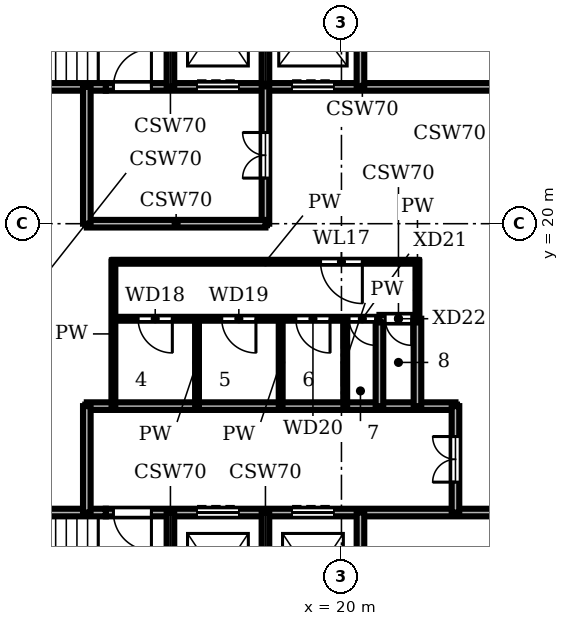
"""IFC4 building model, lengths in metres.
Left out: names, types, materials, properties, quantities, classifications, styles, units other than length and angle.
Written with IfcOpenShell. Run it as: python <this file> out.ifc"""

import sys

from ifc_helpers import new_model, si_unit, direction, frame, frame_2d, origin, place, context, subcontext, project, spatial, rectangle, extrude, element, fill, save


model = new_model("IFC4")
c1 = context("Model", 3, precision=1e-05, world=origin(), true_north=direction((0.0, 1.0)))
c2 = subcontext(c1, "Body", "Model", "MODEL_VIEW")
j1 = project(units=[si_unit("LENGTHUNIT", "METRE"), si_unit("PLANEANGLEUNIT", "RADIAN")], contexts=[c1])
p1 = place(None, origin())
s1 = spatial("IfcSite", under=j1, at=p1, CompositionType="ELEMENT")
p2 = place(p1, origin())
s2 = spatial("IfcBuilding", under=s1, at=p2, CompositionType="ELEMENT")
p3 = place(p2, frame((0.0, 0.0, 213.6)))
s3 = spatial("IfcBuildingStorey", under=s2, at=p3, CompositionType="ELEMENT", Elevation=213.6)
p4 = place(p3, frame((8.7, 12.4, 0.0), z_axis=(0.0, 0.0, 1.0), x_axis=(1.0, 0.0, 0.0)))
e1 = element("IfcWall", 1, at=p4, inside=s3, PredefinedType="SHEAR", context=c2, shape_type="SweptSolid", body=[
    extrude(rectangle(XDim=5.1, YDim=0.2, at=frame_2d((2.55, 0.0))), origin(), (0.0, 0.0, 1.0), 3.58),
])
p5 = place(p3, frame((13.8, 12.4, 0.0), z_axis=(0.0, 0.0, 1.0), x_axis=(1.0, 0.0, 0.0)))
e2 = element("IfcWall", 2, at=p5, inside=s3, PredefinedType="SHEAR", context=c2, shape_type="SweptSolid", body=[
    extrude(rectangle(XDim=13.5, YDim=0.2, at=frame_2d((6.75, 0.0))), origin(), (0.0, 0.0, 1.0), 3.58),
])
p6 = place(p5, frame((2.4, 0.0, 0.0)))
e3 = element("IfcOpeningElement", 3, at=p6, cuts=e2, PredefinedType="OPENING", context=c2, shape_type="SweptSolid", body=[
    extrude(rectangle(XDim=1.1, YDim=2.1, at=frame_2d((0.55, 1.05))), frame((0.0, 0.11, 0.0), z_axis=(0.0, -1.0, 0.0), x_axis=(1.0, 0.0, 0.0)), (0.0, 0.0, 1.0), 0.22),
])
p7 = place(p5, frame((4.9, 0.0, 0.0)))
e4 = element("IfcOpeningElement", 4, at=p7, cuts=e2, PredefinedType="OPENING", context=c2, shape_type="SweptSolid", body=[
    extrude(rectangle(XDim=1.1, YDim=2.1, at=frame_2d((0.55, 1.05))), frame((0.0, 0.11, 0.0), z_axis=(0.0, -1.0, 0.0), x_axis=(1.0, 0.0, 0.0)), (0.0, 0.0, 1.0), 0.22),
])
p8 = place(p5, frame((0.2, 0.0, 0.0)))
e5 = element("IfcOpeningElement", 5, at=p8, cuts=e2, PredefinedType="OPENING", context=c2, shape_type="SweptSolid", body=[
    extrude(rectangle(XDim=1.0, YDim=2.1, at=frame_2d((0.5, 1.05))), frame((0.0, 0.11, 0.0), z_axis=(0.0, -1.0, 0.0), x_axis=(1.0, 0.0, 0.0)), (0.0, 0.0, 1.0), 0.22),
])
p9 = place(p3, frame((13.3, 15.2, 0.0), z_axis=(0.0, 0.0, 1.0), x_axis=(1.0, 0.0, 0.0)))
e6 = element("IfcWall", 6, at=p9, inside=s3, PredefinedType="SHEAR", context=c2, shape_type="SweptSolid", body=[
    extrude(rectangle(XDim=9.7, YDim=0.2, at=frame_2d((4.85, 0.0))), origin(), (0.0, 0.0, 1.0), 3.58),
])
p10 = place(p3, frame((14.0, 17.5, 0.0), z_axis=(0.0, 0.0, 1.0), x_axis=(1.0, 0.0, 0.0)))
e7 = element("IfcWall", 7, at=p10, inside=s3, PredefinedType="PARTITIONING", context=c2, shape_type="SweptSolid", body=[
    extrude(rectangle(XDim=7.0, YDim=0.1, at=frame_2d((3.5, 0.0))), origin(), (0.0, 0.0, 1.0), 3.58),
])
p11 = place(p10, frame((0.65, 0.0, 0.0)))
e8 = element("IfcOpeningElement", 8, at=p11, cuts=e7, PredefinedType="OPENING", context=c2, shape_type="SweptSolid", body=[
    extrude(rectangle(XDim=0.9, YDim=2.1, at=frame_2d((0.45, 1.05))), frame((0.0, 0.06, 0.0), z_axis=(0.0, -1.0, 0.0), x_axis=(1.0, 0.0, 0.0)), (0.0, 0.0, 1.0), 0.12),
])
p12 = place(p10, frame((2.85, 0.0, 0.0)))
e9 = element("IfcOpeningElement", 9, at=p12, cuts=e7, PredefinedType="OPENING", context=c2, shape_type="SweptSolid", body=[
    extrude(rectangle(XDim=0.9, YDim=2.1, at=frame_2d((0.45, 1.05))), frame((0.0, 0.06, 0.0), z_axis=(0.0, -1.0, 0.0), x_axis=(1.0, 0.0, 0.0)), (0.0, 0.0, 1.0), 0.12),
])
p13 = place(p10, frame((4.8, 0.0, 0.0)))
e10 = element("IfcOpeningElement", 10, at=p13, cuts=e7, PredefinedType="OPENING", context=c2, shape_type="SweptSolid", body=[
    extrude(rectangle(XDim=0.9, YDim=2.1, at=frame_2d((0.45, 1.05))), frame((0.0, 0.06, 0.0), z_axis=(0.0, -1.0, 0.0), x_axis=(1.0, 0.0, 0.0)), (0.0, 0.0, 1.0), 0.12),
])
p14 = place(p10, frame((6.2, 0.0, 0.0)))
e11 = element("IfcOpeningElement", 11, at=p14, cuts=e7, PredefinedType="OPENING", context=c2, shape_type="SweptSolid", body=[
    extrude(rectangle(XDim=0.7, YDim=2.1, at=frame_2d((0.35, 1.05))), frame((0.0, 0.06, 0.0), z_axis=(0.0, -1.0, 0.0), x_axis=(1.0, 0.0, 0.0)), (0.0, 0.0, 1.0), 0.12),
])
p15 = place(p3, frame((21.0, 17.5, 0.0), z_axis=(0.0, 0.0, 1.0), x_axis=(1.0, 0.0, 0.0)))
e12 = element("IfcWall", 12, at=p15, inside=s3, PredefinedType="SHEAR", context=c2, shape_type="SweptSolid", body=[
    extrude(rectangle(XDim=1.0, YDim=0.2, at=frame_2d((0.5, 0.0))), origin(), (0.0, 0.0, 1.0), 3.58),
])
p16 = place(p15, frame((0.15, 0.0, 0.0)))
e13 = element("IfcOpeningElement", 13, at=p16, cuts=e12, PredefinedType="OPENING", context=c2, shape_type="SweptSolid", body=[
    extrude(rectangle(XDim=0.7, YDim=2.1, at=frame_2d((0.35, 1.05))), frame((0.0, 0.11, 0.0), z_axis=(0.0, -1.0, 0.0), x_axis=(1.0, 0.0, 0.0)), (0.0, 0.0, 1.0), 0.22),
])
p17 = place(p3, frame((14.0, 19.0, 0.0), z_axis=(0.0, 0.0, 1.0), x_axis=(1.0, 0.0, 0.0)))
e14 = element("IfcWall", 14, at=p17, inside=s3, PredefinedType="PARTITIONING", context=c2, shape_type="SweptSolid", body=[
    extrude(rectangle(XDim=8.0, YDim=0.1, at=frame_2d((4.0, 0.0))), origin(), (0.0, 0.0, 1.0), 3.58),
])
p18 = place(p17, frame((5.45, 0.0, 0.0)))
e15 = element("IfcOpeningElement", 15, at=p18, cuts=e14, PredefinedType="OPENING", context=c2, shape_type="SweptSolid", body=[
    extrude(rectangle(XDim=1.1, YDim=2.1, at=frame_2d((0.55, 1.05))), frame((0.0, 0.06, 0.0), z_axis=(0.0, -1.0, 0.0), x_axis=(1.0, 0.0, 0.0)), (0.0, 0.0, 1.0), 0.12),
])
p19 = place(p3, frame((13.3, 20.0, 0.0), z_axis=(0.0, 0.0, 1.0), x_axis=(1.0, 0.0, 0.0)))
e16 = element("IfcWall", 16, at=p19, inside=s3, PredefinedType="SHEAR", context=c2, shape_type="SweptSolid", body=[
    extrude(rectangle(XDim=4.7, YDim=0.2, at=frame_2d((2.35, 0.0))), origin(), (0.0, 0.0, 1.0), 3.58),
])
p20 = place(p3, frame((8.7, 23.6, 0.0), z_axis=(0.0, 0.0, 1.0), x_axis=(1.0, 0.0, 0.0)))
e17 = element("IfcWall", 17, at=p20, inside=s3, PredefinedType="SHEAR", context=c2, shape_type="SweptSolid", body=[
    extrude(rectangle(XDim=5.1, YDim=0.2, at=frame_2d((2.55, 0.0))), origin(), (0.0, 0.0, 1.0), 3.58),
])
p21 = place(p3, frame((13.8, 23.6, 0.0), z_axis=(0.0, 0.0, 1.0), x_axis=(1.0, 0.0, 0.0)))
e18 = element("IfcWall", 18, at=p21, inside=s3, PredefinedType="SHEAR", context=c2, shape_type="SweptSolid", body=[
    extrude(rectangle(XDim=13.5, YDim=0.2, at=frame_2d((6.75, 0.0))), origin(), (0.0, 0.0, 1.0), 3.58),
])
p22 = place(p21, frame((2.4, 0.0, 0.0)))
e19 = element("IfcOpeningElement", 19, at=p22, cuts=e18, PredefinedType="OPENING", context=c2, shape_type="SweptSolid", body=[
    extrude(rectangle(XDim=1.1, YDim=2.1, at=frame_2d((0.55, 1.05))), frame((0.0, 0.11, 0.0), z_axis=(0.0, -1.0, 0.0), x_axis=(1.0, 0.0, 0.0)), (0.0, 0.0, 1.0), 0.22),
])
p23 = place(p21, frame((4.9, 0.0, 0.0)))
e20 = element("IfcOpeningElement", 20, at=p23, cuts=e18, PredefinedType="OPENING", context=c2, shape_type="SweptSolid", body=[
    extrude(rectangle(XDim=1.1, YDim=2.1, at=frame_2d((0.55, 1.05))), frame((0.0, 0.11, 0.0), z_axis=(0.0, -1.0, 0.0), x_axis=(1.0, 0.0, 0.0)), (0.0, 0.0, 1.0), 0.22),
])
p24 = place(p21, frame((0.2, 0.0, 0.0)))
e21 = element("IfcOpeningElement", 21, at=p24, cuts=e18, PredefinedType="OPENING", context=c2, shape_type="SweptSolid", body=[
    extrude(rectangle(XDim=1.0, YDim=2.1, at=frame_2d((0.5, 1.05))), frame((0.0, 0.11, 0.0), z_axis=(0.0, -1.0, 0.0), x_axis=(1.0, 0.0, 0.0)), (0.0, 0.0, 1.0), 0.22),
])
p25 = place(p3, frame((13.3, 12.4, 0.0), z_axis=(0.0, 0.0, 1.0), x_axis=(0.0, 1.0, 0.0)))
e22 = element("IfcWall", 22, at=p25, inside=s3, PredefinedType="SHEAR", context=c2, shape_type="SweptSolid", body=[
    extrude(rectangle(XDim=2.8, YDim=0.2, at=frame_2d((1.4, 0.0))), origin(), (0.0, 0.0, 1.0), 3.58),
])
p26 = place(p3, frame((13.3, 20.0, 0.0), z_axis=(0.0, 0.0, 1.0), x_axis=(0.0, 1.0, 0.0)))
e23 = element("IfcWall", 23, at=p26, inside=s3, PredefinedType="SHEAR", context=c2, shape_type="SweptSolid", body=[
    extrude(rectangle(XDim=3.6, YDim=0.2, at=frame_2d((1.8, 0.0))), origin(), (0.0, 0.0, 1.0), 3.58),
])
p27 = place(p3, frame((14.0, 15.2, 0.0), z_axis=(0.0, 0.0, 1.0), x_axis=(0.0, 1.0, 0.0)))
e24 = element("IfcWall", 24, at=p27, inside=s3, PredefinedType="PARTITIONING", context=c2, shape_type="SweptSolid", body=[
    extrude(rectangle(XDim=3.8, YDim=0.1, at=frame_2d((1.9, 0.0))), origin(), (0.0, 0.0, 1.0), 3.58),
])
for number, where, z_axis, x_axis in (
    (25, (15.5, 8.7, 0.0), (0.0, 0.0, 1.0), (0.0, 1.0, 0.0)),
    (26, (15.5, 23.6, 0.0), (0.0, 0.0, 1.0), (0.0, 1.0, 0.0)),
):
    element("IfcWall", number, at=place(p3, frame(where, z_axis=z_axis, x_axis=x_axis)), inside=s3, PredefinedType="SHEAR", context=c2, shape_type="SweptSolid", body=[
        extrude(rectangle(XDim=3.7, YDim=0.2, at=frame_2d((1.85, 0.0))), origin(), (0.0, 0.0, 1.0), 3.58),
    ])
p28 = place(p3, frame((16.2, 15.2, 0.0), z_axis=(0.0, 0.0, 1.0), x_axis=(0.0, 1.0, 0.0)))
e27 = element("IfcWall", 27, at=p28, inside=s3, PredefinedType="PARTITIONING", context=c2, shape_type="SweptSolid", body=[
    extrude(rectangle(XDim=2.3, YDim=0.1, at=frame_2d((1.15, 0.0))), origin(), (0.0, 0.0, 1.0), 3.58),
])
p29 = place(p3, frame((18.0, 8.7, 0.0), z_axis=(0.0, 0.0, 1.0), x_axis=(0.0, 1.0, 0.0)))
e28 = element("IfcWall", 28, at=p29, inside=s3, PredefinedType="SHEAR", context=c2, shape_type="SweptSolid", body=[
    extrude(rectangle(XDim=3.7, YDim=0.2, at=frame_2d((1.85, 0.0))), origin(), (0.0, 0.0, 1.0), 3.58),
])
p30 = place(p3, frame((18.0, 20.0, 0.0), z_axis=(0.0, 0.0, 1.0), x_axis=(0.0, 1.0, 0.0)))
e29 = element("IfcWall", 29, at=p30, inside=s3, PredefinedType="SHEAR", context=c2, shape_type="SweptSolid", body=[
    extrude(rectangle(XDim=7.3, YDim=0.2, at=frame_2d((3.65, 0.0))), origin(), (0.0, 0.0, 1.0), 3.58),
])
p31 = place(p30, frame((1.2, 0.0, 0.0)))
e30 = element("IfcOpeningElement", 30, at=p31, cuts=e29, PredefinedType="OPENING", context=c2, shape_type="SweptSolid", body=[
    extrude(rectangle(XDim=1.2, YDim=2.1, at=frame_2d((0.6, 1.05))), frame((0.0, 0.11, 0.0), z_axis=(0.0, -1.0, 0.0), x_axis=(1.0, 0.0, 0.0)), (0.0, 0.0, 1.0), 0.22),
])
for number, where, z_axis, x_axis in (
    (31, (18.4, 15.2, 0.0), (0.0, 0.0, 1.0), (0.0, 1.0, 0.0)),
    (32, (20.1, 15.2, 0.0), (0.0, 0.0, 1.0), (0.0, 1.0, 0.0)),
):
    element("IfcWall", number, at=place(p3, frame(where, z_axis=z_axis, x_axis=x_axis)), inside=s3, PredefinedType="PARTITIONING", context=c2, shape_type="SweptSolid", body=[
        extrude(rectangle(XDim=2.3, YDim=0.1, at=frame_2d((1.15, 0.0))), origin(), (0.0, 0.0, 1.0), 3.58),
    ])
for number, where, z_axis, x_axis in (
    (33, (20.5, 8.7, 0.0), (0.0, 0.0, 1.0), (0.0, 1.0, 0.0)),
    (34, (20.5, 23.6, 0.0), (0.0, 0.0, 1.0), (0.0, 1.0, 0.0)),
):
    element("IfcWall", number, at=place(p3, frame(where, z_axis=z_axis, x_axis=x_axis)), inside=s3, PredefinedType="SHEAR", context=c2, shape_type="SweptSolid", body=[
        extrude(rectangle(XDim=3.7, YDim=0.2, at=frame_2d((1.85, 0.0))), origin(), (0.0, 0.0, 1.0), 3.58),
    ])
p32 = place(p3, frame((21.0, 15.2, 0.0), z_axis=(0.0, 0.0, 1.0), x_axis=(0.0, 1.0, 0.0)))
e35 = element("IfcWall", 35, at=p32, inside=s3, PredefinedType="SHEAR", context=c2, shape_type="SweptSolid", body=[
    extrude(rectangle(XDim=2.3, YDim=0.2, at=frame_2d((1.15, 0.0))), origin(), (0.0, 0.0, 1.0), 3.58),
])
p33 = place(p3, frame((22.0, 17.5, 0.0), z_axis=(0.0, 0.0, 1.0), x_axis=(0.0, 1.0, 0.0)))
e36 = element("IfcWall", 36, at=p33, inside=s3, PredefinedType="PARTITIONING", context=c2, shape_type="SweptSolid", body=[
    extrude(rectangle(XDim=1.5, YDim=0.1, at=frame_2d((0.75, 0.0))), origin(), (0.0, 0.0, 1.0), 3.58),
])
p34 = place(p3, frame((22.0, 15.2, 0.0), z_axis=(0.0, 0.0, 1.0), x_axis=(0.0, 1.0, 0.0)))
e37 = element("IfcWall", 37, at=p34, inside=s3, PredefinedType="SHEAR", context=c2, shape_type="SweptSolid", body=[
    extrude(rectangle(XDim=2.3, YDim=0.2, at=frame_2d((1.15, 0.0))), origin(), (0.0, 0.0, 1.0), 3.58),
])
p35 = place(p3, frame((23.0, 12.4, 0.0), z_axis=(0.0, 0.0, 1.0), x_axis=(0.0, 1.0, 0.0)))
e38 = element("IfcWall", 38, at=p35, inside=s3, PredefinedType="SHEAR", context=c2, shape_type="SweptSolid", body=[
    extrude(rectangle(XDim=2.8, YDim=0.2, at=frame_2d((1.4, 0.0))), origin(), (0.0, 0.0, 1.0), 3.58),
])
p36 = place(p35, frame((0.8, 0.0, 0.0)))
e39 = element("IfcOpeningElement", 39, at=p36, cuts=e38, PredefinedType="OPENING", context=c2, shape_type="SweptSolid", body=[
    extrude(rectangle(XDim=1.2, YDim=2.1, at=frame_2d((0.6, 1.05))), frame((0.0, 0.11, 0.0), z_axis=(0.0, -1.0, 0.0), x_axis=(1.0, 0.0, 0.0)), (0.0, 0.0, 1.0), 0.22),
])
p37 = place(p6, origin())
e40 = element("IfcDoor", 40, at=p37, inside=s3, OperationType="DOUBLE_DOOR_SLIDING", PredefinedType="DOOR", context=c2, shape_type="SweptSolid", body=[
    extrude(rectangle(XDim=1.1, YDim=2.1, at=frame_2d((0.55, 1.05))), frame((0.0, 0.025, 0.0), z_axis=(0.0, -1.0, 0.0), x_axis=(1.0, 0.0, 0.0)), (0.0, 0.0, 1.0), 0.05),
])
fill(e3, e40)
p38 = place(p7, origin())
e41 = element("IfcDoor", 41, at=p38, inside=s3, OperationType="DOUBLE_DOOR_SLIDING", PredefinedType="DOOR", context=c2, shape_type="SweptSolid", body=[
    extrude(rectangle(XDim=1.1, YDim=2.1, at=frame_2d((0.55, 1.05))), frame((0.0, 0.025, 0.0), z_axis=(0.0, -1.0, 0.0), x_axis=(1.0, 0.0, 0.0)), (0.0, 0.0, 1.0), 0.05),
])
fill(e4, e41)
p39 = place(p22, origin())
e42 = element("IfcDoor", 42, at=p39, inside=s3, OperationType="DOUBLE_DOOR_SLIDING", PredefinedType="DOOR", context=c2, shape_type="SweptSolid", body=[
    extrude(rectangle(XDim=1.1, YDim=2.1, at=frame_2d((0.55, 1.05))), frame((0.0, 0.025, 0.0), z_axis=(0.0, -1.0, 0.0), x_axis=(1.0, 0.0, 0.0)), (0.0, 0.0, 1.0), 0.05),
])
fill(e19, e42)
p40 = place(p23, origin())
e43 = element("IfcDoor", 43, at=p40, inside=s3, OperationType="DOUBLE_DOOR_SLIDING", PredefinedType="DOOR", context=c2, shape_type="SweptSolid", body=[
    extrude(rectangle(XDim=1.1, YDim=2.1, at=frame_2d((0.55, 1.05))), frame((0.0, 0.025, 0.0), z_axis=(0.0, -1.0, 0.0), x_axis=(1.0, 0.0, 0.0)), (0.0, 0.0, 1.0), 0.05),
])
fill(e20, e43)
p41 = place(p8, frame((1.0, 0.0, 0.0), z_axis=(0.0, 0.0, 1.0), x_axis=(-1.0, 0.0, 0.0)))
e44 = element("IfcDoor", 44, at=p41, inside=s3, OperationType="SINGLE_SWING_LEFT", PredefinedType="DOOR", context=c2, shape_type="SweptSolid", body=[
    extrude(rectangle(XDim=1.0, YDim=2.1, at=frame_2d((0.5, 1.05))), frame((0.0, 0.025, 0.0), z_axis=(0.0, -1.0, 0.0), x_axis=(1.0, 0.0, 0.0)), (0.0, 0.0, 1.0), 0.05),
])
fill(e5, e44)
p42 = place(p24, origin())
e45 = element("IfcDoor", 45, at=p42, inside=s3, OperationType="SINGLE_SWING_RIGHT", PredefinedType="DOOR", context=c2, shape_type="SweptSolid", body=[
    extrude(rectangle(XDim=1.0, YDim=2.1, at=frame_2d((0.5, 1.05))), frame((0.0, 0.025, 0.0), z_axis=(0.0, -1.0, 0.0), x_axis=(1.0, 0.0, 0.0)), (0.0, 0.0, 1.0), 0.05),
])
fill(e21, e45)
p43 = place(p36, origin())
e46 = element("IfcDoor", 46, at=p43, inside=s3, OperationType="DOUBLE_DOOR_SINGLE_SWING", PredefinedType="DOOR", context=c2, shape_type="SweptSolid", body=[
    extrude(rectangle(XDim=1.2, YDim=2.1, at=frame_2d((0.6, 1.05))), frame((0.0, 0.025, 0.0), z_axis=(0.0, -1.0, 0.0), x_axis=(1.0, 0.0, 0.0)), (0.0, 0.0, 1.0), 0.05),
])
fill(e39, e46)
p44 = place(p31, origin())
e47 = element("IfcDoor", 47, at=p44, inside=s3, OperationType="DOUBLE_DOOR_SINGLE_SWING", PredefinedType="DOOR", context=c2, shape_type="SweptSolid", body=[
    extrude(rectangle(XDim=1.2, YDim=2.1, at=frame_2d((0.6, 1.05))), frame((0.0, 0.025, 0.0), z_axis=(0.0, -1.0, 0.0), x_axis=(1.0, 0.0, 0.0)), (0.0, 0.0, 1.0), 0.05),
])
fill(e30, e47)
p45 = place(p18, frame((1.1, 0.0, 0.0), z_axis=(0.0, 0.0, 1.0), x_axis=(-1.0, 0.0, 0.0)))
e48 = element("IfcDoor", 48, at=p45, inside=s3, OperationType="SINGLE_SWING_LEFT", PredefinedType="DOOR", context=c2, shape_type="SweptSolid", body=[
    extrude(rectangle(XDim=1.1, YDim=2.1, at=frame_2d((0.55, 1.05))), frame((0.0, 0.025, 0.0), z_axis=(0.0, -1.0, 0.0), x_axis=(1.0, 0.0, 0.0)), (0.0, 0.0, 1.0), 0.05),
])
fill(e15, e48)
p46 = place(p11, frame((0.9, 0.0, 0.0), z_axis=(0.0, 0.0, 1.0), x_axis=(-1.0, 0.0, 0.0)))
e49 = element("IfcDoor", 49, at=p46, inside=s3, OperationType="SINGLE_SWING_LEFT", PredefinedType="DOOR", context=c2, shape_type="SweptSolid", body=[
    extrude(rectangle(XDim=0.9, YDim=2.1, at=frame_2d((0.45, 1.05))), frame((0.0, 0.025, 0.0), z_axis=(0.0, -1.0, 0.0), x_axis=(1.0, 0.0, 0.0)), (0.0, 0.0, 1.0), 0.05),
])
fill(e8, e49)
p47 = place(p12, frame((0.9, 0.0, 0.0), z_axis=(0.0, 0.0, 1.0), x_axis=(-1.0, 0.0, 0.0)))
e50 = element("IfcDoor", 50, at=p47, inside=s3, OperationType="SINGLE_SWING_LEFT", PredefinedType="DOOR", context=c2, shape_type="SweptSolid", body=[
    extrude(rectangle(XDim=0.9, YDim=2.1, at=frame_2d((0.45, 1.05))), frame((0.0, 0.025, 0.0), z_axis=(0.0, -1.0, 0.0), x_axis=(1.0, 0.0, 0.0)), (0.0, 0.0, 1.0), 0.05),
])
fill(e9, e50)
p48 = place(p13, frame((0.9, 0.0, 0.0), z_axis=(0.0, 0.0, 1.0), x_axis=(-1.0, 0.0, 0.0)))
e51 = element("IfcDoor", 51, at=p48, inside=s3, OperationType="SINGLE_SWING_LEFT", PredefinedType="DOOR", context=c2, shape_type="SweptSolid", body=[
    extrude(rectangle(XDim=0.9, YDim=2.1, at=frame_2d((0.45, 1.05))), frame((0.0, 0.025, 0.0), z_axis=(0.0, -1.0, 0.0), x_axis=(1.0, 0.0, 0.0)), (0.0, 0.0, 1.0), 0.05),
])
fill(e10, e51)
p49 = place(p14, frame((0.7, 0.0, 0.0), z_axis=(0.0, 0.0, 1.0), x_axis=(-1.0, 0.0, 0.0)))
e52 = element("IfcDoor", 52, at=p49, inside=s3, OperationType="SINGLE_SWING_LEFT", PredefinedType="DOOR", context=c2, shape_type="SweptSolid", body=[
    extrude(rectangle(XDim=0.7, YDim=2.1, at=frame_2d((0.35, 1.05))), frame((0.0, 0.025, 0.0), z_axis=(0.0, -1.0, 0.0), x_axis=(1.0, 0.0, 0.0)), (0.0, 0.0, 1.0), 0.05),
])
fill(e11, e52)
p50 = place(p16, frame((0.7, 0.0, 0.0), z_axis=(0.0, 0.0, 1.0), x_axis=(-1.0, 0.0, 0.0)))
e53 = element("IfcDoor", 53, at=p50, inside=s3, OperationType="SINGLE_SWING_LEFT", PredefinedType="DOOR", context=c2, shape_type="SweptSolid", body=[
    extrude(rectangle(XDim=0.7, YDim=2.1, at=frame_2d((0.35, 1.05))), frame((0.0, 0.025, 0.0), z_axis=(0.0, -1.0, 0.0), x_axis=(1.0, 0.0, 0.0)), (0.0, 0.0, 1.0), 0.05),
])
fill(e13, e53)
save(model, sys.argv[1])
